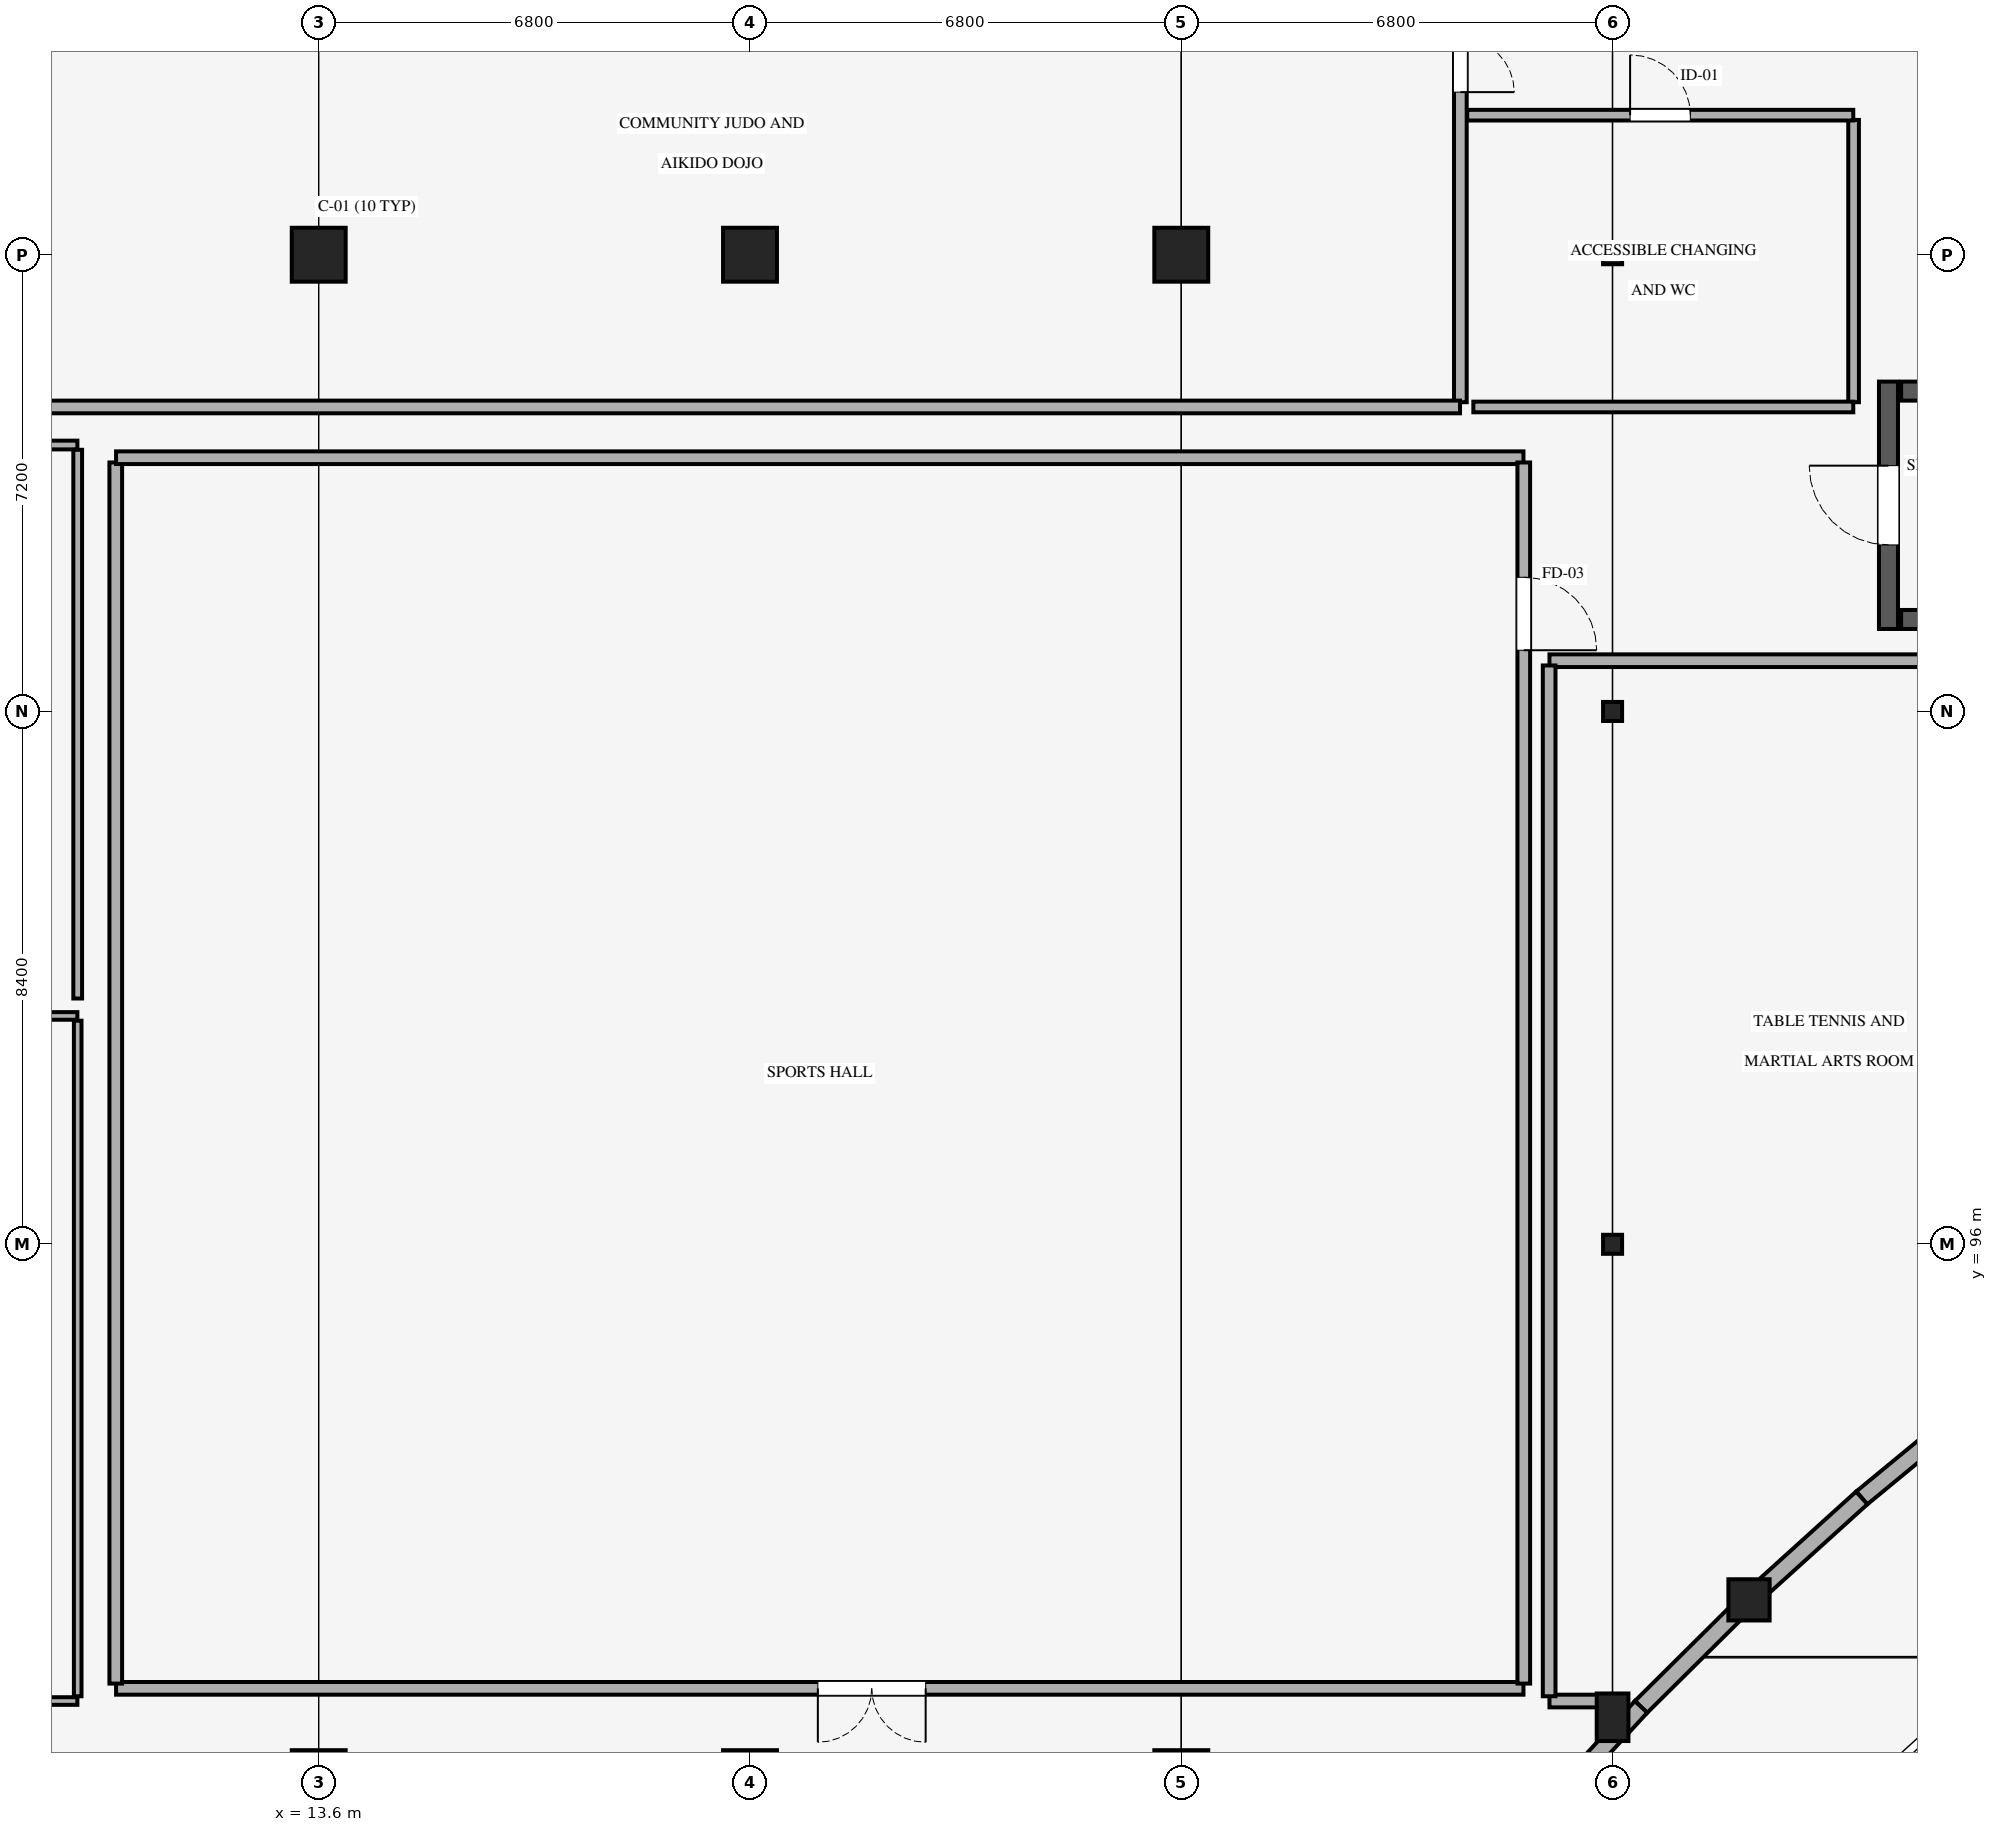
"""IFC4 building model, lengths in metres.
Left out: names, types, materials, properties, quantities, classifications, styles, units other than length and angle.
Written with IfcOpenShell. Run it as: python <this file> out.ifc"""

import sys

from ifc_helpers import new_model, si_unit, direction, frame, frame_2d, origin, origin_2d, place, context, subcontext, project, spatial, rectangle, circle, i_section, extrude, element, fill, save


model = new_model("IFC4")
c1 = context("Model", 3, precision=1e-05, world=origin(), true_north=direction((0.0, 1.0)))
c2 = subcontext(c1, "Body", "Model", "MODEL_VIEW")
j1 = project(units=[si_unit("LENGTHUNIT", "METRE"), si_unit("PLANEANGLEUNIT", "RADIAN")], contexts=[c1])
p1 = place(None, origin())
s1 = spatial("IfcSite", under=j1, at=p1, CompositionType="ELEMENT")
p2 = place(p1, origin())
s2 = spatial("IfcBuilding", under=s1, at=p2, CompositionType="ELEMENT")
p3 = place(p2, origin())
s3 = spatial("IfcBuildingStorey", under=s2, at=p3, CompositionType="ELEMENT", Elevation=0.0)
for number, where, z_axis, x_axis in (
    (1, (13.6, 87.6, 0.0), (0.0, 0.0, 1.0), (1.0, 0.0, 0.0)),
    (2, (13.6, 111.6, 0.0), (0.0, 0.0, 1.0), (1.0, 0.0, 0.0)),
    (3, (20.4, 87.6, 0.0), (0.0, 0.0, 1.0), (1.0, 0.0, 0.0)),
    (4, (20.4, 111.6, 0.0), (0.0, 0.0, 1.0), (1.0, 0.0, 0.0)),
    (5, (27.2, 87.6, 0.0), (0.0, 0.0, 1.0), (1.0, 0.0, 0.0)),
    (6, (27.2, 111.6, 0.0), (0.0, 0.0, 1.0), (1.0, 0.0, 0.0)),
):
    element("IfcColumn", number, at=place(p3, frame(where, z_axis=z_axis, x_axis=x_axis)), inside=s3, PredefinedType="COLUMN", context=c2, shape_type="SweptSolid", body=[
        extrude(rectangle(XDim=0.85, YDim=0.85, at=origin_2d()), origin(), (0.0, 0.0, 1.0), 4.8),
    ])
p4 = place(p3, frame((34.0, 88.544, 0.0), z_axis=(0.0, 0.0, 1.0), x_axis=(1.0, 0.0, 0.0)))
e7 = element("IfcColumn", 7, at=p4, inside=s3, PredefinedType="COLUMN", context=c2, shape_type="SweptSolid", body=[
    extrude(rectangle(XDim=0.5, YDim=0.75, at=origin_2d()), origin(), (0.0, 0.0, 1.0), 4.8),
])
for number, where, z_axis, x_axis in (
    (8, (34.0, 96.0, 0.0), (0.0, 0.0, 1.0), (1.0, 0.0, 0.0)),
    (9, (34.0, 104.4, 0.0), (0.0, 0.0, 1.0), (1.0, 0.0, 0.0)),
    (10, (34.0, 111.6, 0.0), (0.0, 0.0, 1.0), (1.0, 0.0, 0.0)),
):
    element("IfcColumn", number, at=place(p3, frame(where, z_axis=z_axis, x_axis=x_axis)), inside=s3, PredefinedType="COLUMN", context=c2, shape_type="SweptSolid", body=[
        extrude(i_section(OverallWidth=0.3, OverallDepth=0.3, WebThickness=0.01, FlangeThickness=0.015, FilletRadius=0.013, at=origin_2d()), origin(), (0.0, 0.0, 1.0), 4.8),
    ])
p5 = place(p3, frame((36.151, 90.395, 0.0), z_axis=(0.0, 0.0, 1.0), x_axis=(1.0, 0.0, 0.0)))
e11 = element("IfcColumn", 11, at=p5, inside=s3, PredefinedType="COLUMN", context=c2, shape_type="SweptSolid", body=[
    extrude(circle(Radius=0.325, at=origin_2d()), origin(), (0.0, 0.0, 1.0), 4.8),
])
p6 = place(p3, frame((39.779, 93.525, 0.0), z_axis=(0.0, 0.0, 1.0), x_axis=(-0.771924354008, -0.635714394748, 0.0)))
e12 = element("IfcWall", 12, at=p6, inside=s3, PredefinedType="STANDARD", context=c2, shape_type="SweptSolid", body=[
    extrude(rectangle(XDim=2.396, YDim=0.268, at=frame_2d((1.198, 0.0))), origin(), (0.0, 0.0, 1.0), 3.82),
])
p7 = place(p3, frame((37.929, 92.002, 0.0), z_axis=(0.0, 0.0, 1.0), x_axis=(-0.741818117858, -0.670601133325, 0.0)))
e13 = element("IfcWall", 13, at=p7, inside=s3, PredefinedType="STANDARD", context=c2, shape_type="SweptSolid", body=[
    extrude(rectangle(XDim=2.396, YDim=0.268, at=frame_2d((1.198, 0.0))), origin(), (0.0, 0.0, 1.0), 3.82),
])
p8 = place(p3, frame((36.151, 90.395, 0.0), z_axis=(0.0, 0.0, 1.0), x_axis=(-0.710156803668, -0.704043545673, 0.0)))
e14 = element("IfcWall", 14, at=p8, inside=s3, PredefinedType="STANDARD", context=c2, shape_type="SweptSolid", body=[
    extrude(rectangle(XDim=2.396, YDim=0.268, at=frame_2d((1.198, 0.0))), origin(), (0.0, 0.0, 1.0), 3.62),
])
p9 = place(p3, frame((34.449, 88.708, 0.0), z_axis=(0.0, 0.0, 1.0), x_axis=(-0.676946175491, -0.73603252339, 0.0)))
e15 = element("IfcWall", 15, at=p9, inside=s3, PredefinedType="STANDARD", context=c2, shape_type="SweptSolid", body=[
    extrude(rectangle(XDim=2.396, YDim=0.268, at=frame_2d((1.198, 0.0))), origin(), (0.0, 0.0, 1.0), 3.62),
])
p10 = place(p3, frame((38.35, 109.6, 0.0), z_axis=(0.0, 0.0, 1.0), x_axis=(0.0, -1.0, 0.0)))
e16 = element("IfcWall", 16, at=p10, inside=s3, PredefinedType="SHEAR", context=c2, shape_type="SweptSolid", body=[
    extrude(rectangle(XDim=3.9, YDim=0.3, at=frame_2d((1.95, 0.0))), origin(), (0.0, 0.0, 1.0), 4.495),
])
p11 = place(p10, frame((1.325, 0.0, 0.0)))
e17 = element("IfcOpeningElement", 17, at=p11, cuts=e16, PredefinedType="OPENING", context=c2, shape_type="SweptSolid", body=[
    extrude(rectangle(XDim=1.25, YDim=2.2, at=frame_2d((0.625, 1.1))), frame((0.0, 0.16, 0.0), z_axis=(0.0, -1.0, 0.0), x_axis=(1.0, 0.0, 0.0)), (0.0, 0.0, 1.0), 0.32),
])
for number, where, z_axis, x_axis in (
    (18, (38.55, 105.85, 0.0), (0.0, 0.0, 1.0), (1.0, 0.0, 0.0)),
    (19, (46.65, 109.45, 0.0), (0.0, 0.0, 1.0), (-1.0, 0.0, 0.0)),
):
    element("IfcWall", number, at=place(p3, frame(where, z_axis=z_axis, x_axis=x_axis)), inside=s3, PredefinedType="SHEAR", context=c2, shape_type="SweptSolid", body=[
        extrude(rectangle(XDim=8.1, YDim=0.3, at=frame_2d((4.05, 0.0))), origin(), (0.0, 0.0, 1.0), 4.495),
    ])
p12 = place(p3, frame((33.005, 105.2, 0.0), z_axis=(0.0, 0.0, 1.0), x_axis=(1.0, 0.0, 0.0)))
e20 = element("IfcWall", 20, at=p12, inside=s3, PredefinedType="STANDARD", context=c2, shape_type="SweptSolid", body=[
    extrude(rectangle(XDim=20.59, YDim=0.2, at=frame_2d((10.295, 0.0))), origin(), (0.0, 0.0, 1.0), 4.12),
])
p13 = place(p12, frame((15.49, 0.0, 0.0)))
e21 = element("IfcOpeningElement", 21, at=p13, cuts=e20, PredefinedType="OPENING", context=c2, shape_type="SweptSolid", body=[
    extrude(rectangle(XDim=1.7, YDim=2.3, at=frame_2d((0.85, 1.15))), frame((0.0, 0.11, 0.0), z_axis=(0.0, -1.0, 0.0), x_axis=(1.0, 0.0, 0.0)), (0.0, 0.0, 1.0), 0.22),
])
p14 = place(p3, frame((34.203, 88.8, 0.0), z_axis=(0.0, 0.0, 1.0), x_axis=(-1.0, 0.0, 0.0)))
e22 = element("IfcWall", 22, at=p14, inside=s3, PredefinedType="STANDARD", context=c2, shape_type="SweptSolid", body=[
    extrude(rectangle(XDim=1.198, YDim=0.2, at=frame_2d((0.599, 0.0))), origin(), (0.0, 0.0, 1.0), 3.62),
])
p15 = place(p3, frame((33.0, 88.875, 0.0), z_axis=(0.0, 0.0, 1.0), x_axis=(0.0, 1.0, 0.0)))
e23 = element("IfcWall", 23, at=p15, inside=s3, PredefinedType="STANDARD", context=c2, shape_type="SweptSolid", body=[
    extrude(rectangle(XDim=16.25, YDim=0.2, at=frame_2d((8.125, 0.0))), origin(), (0.0, 0.0, 1.0), 4.49),
])
p16 = place(p3, frame((32.595, 89.0, 0.0), z_axis=(0.0, 0.0, 1.0), x_axis=(-1.0, 0.0, 0.0)))
e24 = element("IfcWall", 24, at=p16, inside=s3, PredefinedType="STANDARD", context=c2, shape_type="SweptSolid", body=[
    extrude(rectangle(XDim=22.19, YDim=0.2, at=frame_2d((11.095, 0.0))), origin(), (0.0, 0.0, 1.0), 4.49),
])
p17 = place(p16, frame((9.425, 0.0, 0.0)))
e25 = element("IfcOpeningElement", 25, at=p17, cuts=e24, PredefinedType="OPENING", context=c2, shape_type="SweptSolid", body=[
    extrude(rectangle(XDim=1.7, YDim=2.3, at=frame_2d((0.85, 1.15))), frame((0.0, 0.11, 0.0), z_axis=(0.0, -1.0, 0.0), x_axis=(1.0, 0.0, 0.0)), (0.0, 0.0, 1.0), 0.22),
])
p18 = place(p3, frame((10.4, 89.075, 0.0), z_axis=(0.0, 0.0, 1.0), x_axis=(0.0, 1.0, 0.0)))
e26 = element("IfcWall", 26, at=p18, inside=s3, PredefinedType="STANDARD", context=c2, shape_type="SweptSolid", body=[
    extrude(rectangle(XDim=19.25, YDim=0.2, at=frame_2d((9.625, 0.0))), origin(), (0.0, 0.0, 1.0), 4.49),
])
p19 = place(p3, frame((10.405, 108.4, 0.0), z_axis=(0.0, 0.0, 1.0), x_axis=(1.0, 0.0, 0.0)))
e27 = element("IfcWall", 27, at=p19, inside=s3, PredefinedType="STANDARD", context=c2, shape_type="SweptSolid", body=[
    extrude(rectangle(XDim=22.19, YDim=0.2, at=frame_2d((11.095, 0.0))), origin(), (0.0, 0.0, 1.0), 4.49),
])
p20 = place(p3, frame((32.6, 108.325, 0.0), z_axis=(0.0, 0.0, 1.0), x_axis=(0.0, -1.0, 0.0)))
e28 = element("IfcWall", 28, at=p20, inside=s3, PredefinedType="STANDARD", context=c2, shape_type="SweptSolid", body=[
    extrude(rectangle(XDim=19.25, YDim=0.2, at=frame_2d((9.625, 0.0))), origin(), (0.0, 0.0, 1.0), 4.49),
])
p21 = place(p20, frame((1.81, 0.0, 0.0)))
e29 = element("IfcOpeningElement", 29, at=p21, cuts=e28, PredefinedType="OPENING", context=c2, shape_type="SweptSolid", body=[
    extrude(rectangle(XDim=1.15, YDim=2.2, at=frame_2d((0.575, 1.1))), frame((0.0, 0.11, 0.0), z_axis=(0.0, -1.0, 0.0), x_axis=(1.0, 0.0, 0.0)), (0.0, 0.0, 1.0), 0.22),
])
p22 = place(p3, frame((9.795, 88.8, 0.0), z_axis=(0.0, 0.0, 1.0), x_axis=(-1.0, 0.0, 0.0)))
e30 = element("IfcWall", 30, at=p22, inside=s3, PredefinedType="STANDARD", context=c2, shape_type="SweptSolid", body=[
    extrude(rectangle(XDim=8.212, YDim=0.12, at=frame_2d((4.106, 0.0))), origin(), (0.0, 0.0, 1.0), 3.82),
])
p23 = place(p22, frame((3.606, 0.0, 0.0)))
e31 = element("IfcOpeningElement", 31, at=p23, cuts=e30, PredefinedType="OPENING", context=c2, shape_type="SweptSolid", body=[
    extrude(rectangle(XDim=1.0, YDim=2.1, at=frame_2d((0.5, 1.05))), frame((0.0, 0.07, 0.0), z_axis=(0.0, -1.0, 0.0), x_axis=(1.0, 0.0, 0.0)), (0.0, 0.0, 1.0), 0.14),
])
p24 = place(p3, frame((1.405, 99.6, 0.0), z_axis=(0.0, 0.0, 1.0), x_axis=(1.0, 0.0, 0.0)))
e32 = element("IfcWall", 32, at=p24, inside=s3, PredefinedType="STANDARD", context=c2, shape_type="SweptSolid", body=[
    extrude(rectangle(XDim=8.39, YDim=0.12, at=frame_2d((4.195, 0.0))), origin(), (0.0, 0.0, 1.0), 3.62),
])
p25 = place(p3, frame((9.8, 99.525, 0.0), z_axis=(0.0, 0.0, 1.0), x_axis=(0.0, -1.0, 0.0)))
e33 = element("IfcWall", 33, at=p25, inside=s3, PredefinedType="STANDARD", context=c2, shape_type="SweptSolid", body=[
    extrude(rectangle(XDim=10.65, YDim=0.12, at=frame_2d((5.325, 0.0))), origin(), (0.0, 0.0, 1.0), 4.49),
])
p26 = place(p3, frame((2.476, 108.6, 0.0), z_axis=(0.0, 0.0, 1.0), x_axis=(1.0, 0.0, 0.0)))
e34 = element("IfcWall", 34, at=p26, inside=s3, PredefinedType="STANDARD", context=c2, shape_type="SweptSolid", body=[
    extrude(rectangle(XDim=7.319, YDim=0.138, at=frame_2d((3.659, 0.0))), origin(), (0.0, 0.0, 1.0), 3.82),
])
p27 = place(p26, frame((3.11, 0.0, 0.0)))
e35 = element("IfcOpeningElement", 35, at=p27, cuts=e34, PredefinedType="OPENING", context=c2, shape_type="SweptSolid", body=[
    extrude(rectangle(XDim=1.1, YDim=2.2, at=frame_2d((0.55, 1.1))), frame((0.0, 0.079, 0.0), z_axis=(0.0, -1.0, 0.0), x_axis=(1.0, 0.0, 0.0)), (0.0, 0.0, 1.0), 0.158),
])
p28 = place(p3, frame((9.8, 108.525, 0.0), z_axis=(0.0, 0.0, 1.0), x_axis=(0.0, -1.0, 0.0)))
e36 = element("IfcWall", 36, at=p28, inside=s3, PredefinedType="STANDARD", context=c2, shape_type="SweptSolid", body=[
    extrude(rectangle(XDim=8.65, YDim=0.138, at=frame_2d((4.325, 0.0))), origin(), (0.0, 0.0, 1.0), 4.49),
])
p29 = place(p3, frame((31.6, 117.958, 0.0), z_axis=(0.0, 0.0, 1.0), x_axis=(0.0, -1.0, 0.0)))
e37 = element("IfcWall", 37, at=p29, inside=s3, PredefinedType="STANDARD", context=c2, shape_type="SweptSolid", body=[
    extrude(rectangle(XDim=8.683, YDim=0.2, at=frame_2d((4.342, 0.0))), origin(), (0.0, 0.0, 1.0), 3.62),
])
p30 = place(p29, frame((2.095, 0.0, 0.0)))
e38 = element("IfcOpeningElement", 38, at=p30, cuts=e37, PredefinedType="OPENING", context=c2, shape_type="SweptSolid", body=[
    extrude(rectangle(XDim=1.7, YDim=2.3, at=frame_2d((0.85, 1.15))), frame((0.0, 0.11, 0.0), z_axis=(0.0, -1.0, 0.0), x_axis=(1.0, 0.0, 0.0)), (0.0, 0.0, 1.0), 0.22),
])
p31 = place(p3, frame((31.595, 109.2, 0.0), z_axis=(0.0, 0.0, 1.0), x_axis=(-1.0, 0.0, 0.0)))
e39 = element("IfcWall", 39, at=p31, inside=s3, PredefinedType="STANDARD", context=c2, shape_type="SweptSolid", body=[
    extrude(rectangle(XDim=23.59, YDim=0.2, at=frame_2d((11.795, 0.0))), origin(), (0.0, 0.0, 1.0), 4.49),
])
p32 = place(p3, frame((37.8, 113.725, 0.0), z_axis=(0.0, 0.0, 1.0), x_axis=(0.0, -1.0, 0.0)))
e40 = element("IfcWall", 40, at=p32, inside=s3, PredefinedType="STANDARD", context=c2, shape_type="SweptSolid", body=[
    extrude(rectangle(XDim=4.45, YDim=0.168, at=frame_2d((2.225, 0.0))), origin(), (0.0, 0.0, 1.0), 3.62),
])
p33 = place(p3, frame((37.795, 109.2, 0.0), z_axis=(0.0, 0.0, 1.0), x_axis=(-1.0, 0.0, 0.0)))
e41 = element("IfcWall", 41, at=p33, inside=s3, PredefinedType="STANDARD", context=c2, shape_type="SweptSolid", body=[
    extrude(rectangle(XDim=5.99, YDim=0.168, at=frame_2d((2.995, 0.0))), origin(), (0.0, 0.0, 1.0), 4.12),
])
p34 = place(p3, frame((31.708, 113.8, 0.0), z_axis=(0.0, 0.0, 1.0), x_axis=(1.0, 0.0, 0.0)))
e42 = element("IfcWall", 42, at=p34, inside=s3, PredefinedType="STANDARD", context=c2, shape_type="SweptSolid", body=[
    extrude(rectangle(XDim=6.087, YDim=0.168, at=frame_2d((3.043, 0.0))), origin(), (0.0, 0.0, 1.0), 4.49),
])
p35 = place(p34, frame((2.569, 0.0, 0.0)))
e43 = element("IfcOpeningElement", 43, at=p35, cuts=e42, PredefinedType="OPENING", context=c2, shape_type="SweptSolid", body=[
    extrude(rectangle(XDim=0.95, YDim=2.1, at=frame_2d((0.475, 1.05))), frame((0.0, 0.094, 0.0), z_axis=(0.0, -1.0, 0.0), x_axis=(1.0, 0.0, 0.0)), (0.0, 0.0, 1.0), 0.188),
])
p36 = place(p11, frame((1.25, 0.0, 0.0), z_axis=(0.0, 0.0, 1.0), x_axis=(-1.0, 0.0, 0.0)))
e44 = element("IfcDoor", 44, at=p36, inside=s3, OperationType="SINGLE_SWING_LEFT", PredefinedType="DOOR", context=c2, shape_type="SweptSolid", body=[
    extrude(rectangle(XDim=1.25, YDim=2.2, at=frame_2d((0.625, 1.1))), frame((0.0, 0.025, 0.0), z_axis=(0.0, -1.0, 0.0), x_axis=(1.0, 0.0, 0.0)), (0.0, 0.0, 1.0), 0.05),
])
fill(e17, e44)
p37 = place(p17, origin())
e45 = element("IfcDoor", 45, at=p37, inside=s3, OperationType="DOUBLE_DOOR_SINGLE_SWING", PredefinedType="DOOR", context=c2, shape_type="SweptSolid", body=[
    extrude(rectangle(XDim=1.7, YDim=2.3, at=frame_2d((0.85, 1.15))), frame((0.0, 0.025, 0.0), z_axis=(0.0, -1.0, 0.0), x_axis=(1.0, 0.0, 0.0)), (0.0, 0.0, 1.0), 0.05),
])
fill(e25, e45)
p38 = place(p21, origin())
e46 = element("IfcDoor", 46, at=p38, inside=s3, OperationType="SINGLE_SWING_RIGHT", PredefinedType="DOOR", context=c2, shape_type="SweptSolid", body=[
    extrude(rectangle(XDim=1.15, YDim=2.2, at=frame_2d((0.575, 1.1))), frame((0.0, 0.025, 0.0), z_axis=(0.0, -1.0, 0.0), x_axis=(1.0, 0.0, 0.0)), (0.0, 0.0, 1.0), 0.05),
])
fill(e29, e46)
p39 = place(p30, origin())
e47 = element("IfcDoor", 47, at=p39, inside=s3, OperationType="DOUBLE_DOOR_SINGLE_SWING", PredefinedType="DOOR", context=c2, shape_type="SweptSolid", body=[
    extrude(rectangle(XDim=1.7, YDim=2.3, at=frame_2d((0.85, 1.15))), frame((0.0, 0.025, 0.0), z_axis=(0.0, -1.0, 0.0), x_axis=(1.0, 0.0, 0.0)), (0.0, 0.0, 1.0), 0.05),
])
fill(e38, e47)
p40 = place(p35, origin())
e48 = element("IfcDoor", 48, at=p40, inside=s3, OperationType="SINGLE_SWING_LEFT", PredefinedType="DOOR", context=c2, shape_type="SweptSolid", body=[
    extrude(rectangle(XDim=0.95, YDim=2.1, at=frame_2d((0.475, 1.05))), frame((0.0, 0.025, 0.0), z_axis=(0.0, -1.0, 0.0), x_axis=(1.0, 0.0, 0.0)), (0.0, 0.0, 1.0), 0.05),
])
fill(e43, e48)
save(model, sys.argv[1])
